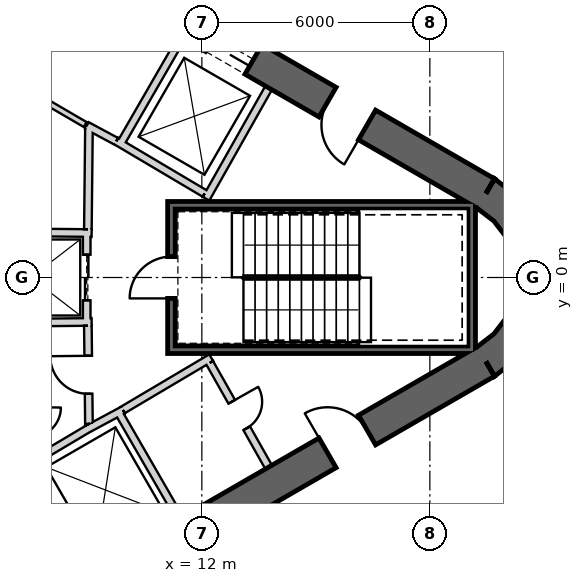
"""IFC4 building model, lengths in metres.
Left out: names, types, materials, properties, quantities, classifications, styles, units other than length and angle.
Written with IfcOpenShell. Run it as: python <this file> out.ifc"""

import sys

from ifc_helpers import new_model, si_unit, direction, frame, frame_2d, origin, place, context, subcontext, project, spatial, polyline, rectangle, outline, extrude, element, fill, save


model = new_model("IFC4")
c1 = context("Model", 3, precision=1e-05, world=origin(), true_north=direction((0.0, 1.0)))
c2 = subcontext(c1, "Body", "Model", "MODEL_VIEW")
j1 = project(units=[si_unit("LENGTHUNIT", "METRE"), si_unit("PLANEANGLEUNIT", "RADIAN")], contexts=[c1])
p1 = place(None, origin())
s1 = spatial("IfcSite", under=j1, at=p1, CompositionType="ELEMENT")
p2 = place(p1, origin())
s2 = spatial("IfcBuilding", under=s1, at=p2, CompositionType="ELEMENT")
p3 = place(p2, frame((0.0, 0.0, 298.7)))
s3 = spatial("IfcBuildingStorey", under=s2, at=p3, CompositionType="ELEMENT", Elevation=298.7)
p4 = place(p3, frame((19.475, 2.208, 0.0), z_axis=(0.0, 0.0, 1.0), x_axis=(-0.866028369851, 0.499994862586, 0.0)))
e1 = element("IfcWall", 1, at=p4, inside=s3, PredefinedType="SHEAR", context=c2, shape_type="SweptSolid", body=[
    extrude(rectangle(XDim=31.523, YDim=0.9, at=frame_2d((15.762, 0.0))), origin(), (0.0, 0.0, 1.0), 3.9),
])
p5 = place(p4, frame((7.062, 0.0, 0.0)))
e2 = element("IfcOpeningElement", 2, at=p5, cuts=e1, PredefinedType="OPENING", context=c2, shape_type="SweptSolid", body=[
    extrude(rectangle(XDim=1.2, YDim=2.4, at=frame_2d((0.6, 1.2))), frame((0.0, 0.46, 0.0), z_axis=(0.0, -1.0, 0.0), x_axis=(1.0, 0.0, 0.0)), (0.0, 0.0, 1.0), 0.92),
])
p6 = place(p4, frame((3.612, 0.0, 0.0)))
e3 = element("IfcOpeningElement", 3, at=p6, cuts=e1, PredefinedType="OPENING", context=c2, shape_type="SweptSolid", body=[
    extrude(rectangle(XDim=1.2, YDim=2.4, at=frame_2d((0.6, 1.2))), frame((0.0, 0.46, 0.0), z_axis=(0.0, -1.0, 0.0), x_axis=(1.0, 0.0, 0.0)), (0.0, 0.0, 1.0), 0.92),
])
p7 = place(p4, frame((26.712, 0.0, 0.0)))
e4 = element("IfcOpeningElement", 4, at=p7, cuts=e1, PredefinedType="OPENING", context=c2, shape_type="SweptSolid", body=[
    extrude(rectangle(XDim=1.2, YDim=2.4, at=frame_2d((0.6, 1.2))), frame((0.0, 0.46, 0.0), z_axis=(0.0, -1.0, 0.0), x_axis=(1.0, 0.0, 0.0)), (0.0, 0.0, 1.0), 0.92),
])
p8 = place(p3, frame((-7.825, -17.97, 0.0), z_axis=(0.0, 0.0, 1.0), x_axis=(0.866028369851, 0.499994862586, 0.0)))
e5 = element("IfcWall", 5, at=p8, inside=s3, PredefinedType="SHEAR", context=c2, shape_type="SweptSolid", body=[
    extrude(rectangle(XDim=31.523, YDim=0.9, at=frame_2d((15.762, 0.0))), origin(), (0.0, 0.0, 1.0), 3.9),
])
p9 = place(p8, frame((17.862, 0.0, 0.0)))
e6 = element("IfcOpeningElement", 6, at=p9, cuts=e5, PredefinedType="OPENING", context=c2, shape_type="SweptSolid", body=[
    extrude(rectangle(XDim=1.2, YDim=2.4, at=frame_2d((0.6, 1.2))), frame((0.0, 0.46, 0.0), z_axis=(0.0, -1.0, 0.0), x_axis=(1.0, 0.0, 0.0)), (0.0, 0.0, 1.0), 0.92),
])
p10 = place(p8, frame((20.562, 0.0, 0.0)))
e7 = element("IfcOpeningElement", 7, at=p10, cuts=e5, PredefinedType="OPENING", context=c2, shape_type="SweptSolid", body=[
    extrude(rectangle(XDim=1.2, YDim=2.4, at=frame_2d((0.6, 1.2))), frame((0.0, 0.46, 0.0), z_axis=(0.0, -1.0, 0.0), x_axis=(1.0, 0.0, 0.0)), (0.0, 0.0, 1.0), 0.92),
])
p11 = place(p8, frame((26.712, 0.0, 0.0)))
e8 = element("IfcOpeningElement", 8, at=p11, cuts=e5, PredefinedType="OPENING", context=c2, shape_type="SweptSolid", body=[
    extrude(rectangle(XDim=1.2, YDim=2.4, at=frame_2d((0.6, 1.2))), frame((0.0, 0.46, 0.0), z_axis=(0.0, -1.0, 0.0), x_axis=(1.0, 0.0, 0.0)), (0.0, 0.0, 1.0), 0.92),
])
p12 = place(p8, frame((3.612, 0.0, 0.0)))
e9 = element("IfcOpeningElement", 9, at=p12, cuts=e5, PredefinedType="OPENING", context=c2, shape_type="SweptSolid", body=[
    extrude(rectangle(XDim=1.2, YDim=2.4, at=frame_2d((0.6, 1.2))), frame((0.0, 0.46, 0.0), z_axis=(0.0, -1.0, 0.0), x_axis=(1.0, 0.0, 0.0)), (0.0, 0.0, 1.0), 0.92),
])
p13 = place(p3, origin())
e10 = element("IfcWall", 10, at=p13, inside=s3, PredefinedType="SHEAR", context=c2, shape_type="SweptSolid", body=[
    extrude(outline(polyline([(19.7, -2.598), (20.321, -2.121), (20.798, -1.5), (21.098, -0.777), (21.2, 0.0), (21.098, 0.777), (20.798, 1.5), (20.321, 2.121), (19.7, 2.598), (19.25, 1.819), (19.685, 1.485), (20.019, 1.05), (20.229, 0.543), (20.3, 0.0), (20.229, -0.543), (20.019, -1.05), (19.685, -1.485), (19.25, -1.819), (19.7, -2.598)])), origin(), (0.0, 0.0, 1.0), 3.9),
])
p14 = place(p3, frame((9.847, 3.495, 0.0), z_axis=(0.0, 0.0, 1.0), x_axis=(0.499984717929, 0.866034226713, 0.0)))
e11 = element("IfcWall", 11, at=p14, inside=s3, PredefinedType="PLUMBINGWALL", context=c2, shape_type="SweptSolid", body=[
    extrude(rectangle(XDim=3.25, YDim=0.2, at=frame_2d((1.625, 0.0))), origin(), (0.0, 0.0, 1.0), 3.6),
])
p15 = place(p3, frame((12.11, 2.073, 0.0), z_axis=(0.0, 0.0, 1.0), x_axis=(0.49196600604, 0.870614408852, 0.0)))
e12 = element("IfcWall", 12, at=p15, inside=s3, PredefinedType="PLUMBINGWALL", context=c2, shape_type="SweptSolid", body=[
    extrude(rectangle(XDim=3.35, YDim=0.2, at=frame_2d((1.675, 0.0))), origin(), (0.0, 0.0, 1.0), 3.6),
])
p16 = place(p3, frame((12.073, 2.211, 0.0), z_axis=(0.0, 0.0, 1.0), x_axis=(-0.860414880418, 0.509594185166, 0.0)))
e13 = element("IfcWall", 13, at=p16, inside=s3, PredefinedType="PLUMBINGWALL", context=c2, shape_type="SweptSolid", body=[
    extrude(rectangle(XDim=2.7, YDim=0.2, at=frame_2d((1.35, 0.0))), origin(), (0.0, 0.0, 1.0), 3.6),
])
p17 = place(p3, frame((9.795, -3.525, 0.0), z_axis=(0.0, 0.0, 1.0), x_axis=(0.499984717929, -0.866034226713, 0.0)))
e14 = element("IfcWall", 14, at=p17, inside=s3, PredefinedType="PLUMBINGWALL", context=c2, shape_type="SweptSolid", body=[
    extrude(rectangle(XDim=3.25, YDim=0.2, at=frame_2d((1.625, 0.0))), origin(), (0.0, 0.0, 1.0), 3.6),
])
p18 = place(p3, frame((8.974, -3.999, 0.0), z_axis=(0.0, 0.0, 1.0), x_axis=(0.880907015104, 0.473289373154, 0.0)))
e15 = element("IfcWall", 15, at=p18, inside=s3, PredefinedType="PLUMBINGWALL", context=c2, shape_type="SweptSolid", body=[
    extrude(rectangle(XDim=1.078, YDim=0.2, at=frame_2d((0.539, 0.0))), origin(), (0.0, 0.0, 1.0), 3.6),
])
p19 = place(p3, frame((7.493, -4.878, 0.0), z_axis=(0.0, 0.0, 1.0), x_axis=(0.859981807212, 0.510324691999, 0.0)))
e16 = element("IfcWall", 16, at=p19, inside=s3, PredefinedType="PLUMBINGWALL", context=c2, shape_type="SweptSolid", body=[
    extrude(rectangle(XDim=1.845, YDim=0.2, at=frame_2d((0.922, 0.0))), origin(), (0.0, 0.0, 1.0), 3.6),
])
p20 = place(p3, frame((19.2, 1.9, -0.3), z_axis=(0.0, 0.0, 1.0), x_axis=(-1.0, 0.0, 0.0)))
e17 = element("IfcWall", 17, at=p20, inside=s3, PredefinedType="SHEAR", context=c2, shape_type="SweptSolid", body=[
    extrude(rectangle(XDim=8.1, YDim=0.2, at=frame_2d((4.05, 0.0))), origin(), (0.0, 0.0, 1.0), 3.9),
])
p21 = place(p3, frame((19.1, -2.0, -0.3), z_axis=(0.0, 0.0, 1.0), x_axis=(0.0, 1.0, 0.0)))
e18 = element("IfcWall", 18, at=p21, inside=s3, PredefinedType="SHEAR", context=c2, shape_type="SweptSolid", body=[
    extrude(rectangle(XDim=3.8, YDim=0.2, at=frame_2d((1.9, 0.0))), origin(), (0.0, 0.0, 1.0), 3.9),
])
p22 = place(p3, frame((11.1, -1.9, -0.3), z_axis=(0.0, 0.0, 1.0), x_axis=(1.0, 0.0, 0.0)))
e19 = element("IfcWall", 19, at=p22, inside=s3, PredefinedType="SHEAR", context=c2, shape_type="SweptSolid", body=[
    extrude(rectangle(XDim=7.9, YDim=0.2, at=frame_2d((3.95, 0.0))), origin(), (0.0, 0.0, 1.0), 3.9),
])
p23 = place(p3, frame((11.2, -1.8, -0.3), z_axis=(0.0, 0.0, 1.0), x_axis=(0.0, 1.0, 0.0)))
e20 = element("IfcWall", 20, at=p23, inside=s3, PredefinedType="SHEAR", context=c2, shape_type="SweptSolid", body=[
    extrude(rectangle(XDim=3.6, YDim=0.2, at=frame_2d((1.8, 0.0))), origin(), (0.0, 0.0, 1.0), 3.9),
])
p24 = place(p23, frame((1.25, 0.0, 0.3)))
e21 = element("IfcOpeningElement", 21, at=p24, cuts=e20, PredefinedType="OPENING", context=c2, shape_type="SweptSolid", body=[
    extrude(rectangle(XDim=1.1, YDim=2.1, at=frame_2d((0.55, 1.05))), frame((0.0, 0.11, 0.0), z_axis=(0.0, -1.0, 0.0), x_axis=(1.0, 0.0, 0.0)), (0.0, 0.0, 1.0), 0.22),
])
p25 = place(p3, frame((8.97, 1.2, 0.0), z_axis=(0.0, 0.0, 1.0), x_axis=(0.0, -1.0, 0.0)))
e22 = element("IfcWall", 22, at=p25, inside=s3, PredefinedType="PLUMBINGWALL", context=c2, shape_type="SweptSolid", body=[
    extrude(rectangle(XDim=2.4, YDim=0.2, at=frame_2d((1.2, 0.0))), origin(), (0.0, 0.0, 1.0), 3.6),
])
p26 = place(p25, frame((0.6, 0.0, 0.0)))
e23 = element("IfcOpeningElement", 23, at=p26, cuts=e22, PredefinedType="OPENING", context=c2, shape_type="SweptSolid", body=[
    extrude(rectangle(XDim=1.2, YDim=2.4, at=frame_2d((0.6, 1.2))), frame((0.0, 0.11, 0.0), z_axis=(0.0, -1.0, 0.0), x_axis=(1.0, 0.0, 0.0)), (0.0, 0.0, 1.0), 0.22),
])
p27 = place(p3, frame((6.0, 1.2, 0.0), z_axis=(0.0, 0.0, 1.0), x_axis=(0.999949988, -0.010001074852, 0.0)))
e24 = element("IfcWall", 24, at=p27, inside=s3, PredefinedType="PLUMBINGWALL", context=c2, shape_type="SweptSolid", body=[
    extrude(rectangle(XDim=3.1, YDim=0.2, at=frame_2d((1.55, 0.0))), origin(), (0.0, 0.0, 1.0), 3.6),
])
p28 = place(p3, frame((5.9, -1.201, 0.0), z_axis=(0.0, 0.0, 1.0), x_axis=(0.999950064753, 0.009993397809, 0.0)))
e25 = element("IfcWall", 25, at=p28, inside=s3, PredefinedType="PLUMBINGWALL", context=c2, shape_type="SweptSolid", body=[
    extrude(rectangle(XDim=3.2, YDim=0.2, at=frame_2d((1.6, 0.0))), origin(), (0.0, 0.0, 1.0), 3.6),
])
p29 = place(p3, frame((8.974, 3.999, 0.0), z_axis=(0.0, 0.0, 1.0), x_axis=(0.880917147855, -0.473270513147, 0.0)))
e26 = element("IfcWall", 26, at=p29, inside=s3, PredefinedType="PARTITIONING", context=c2, shape_type="SweptSolid", body=[
    extrude(rectangle(XDim=0.878, YDim=0.2, at=frame_2d((0.439, 0.0))), origin(), (0.0, 0.0, 1.0), 3.6),
])
p30 = place(p3, frame((8.931, 4.024, 0.0), z_axis=(0.0, 0.0, 1.0), x_axis=(-0.863936620311, 0.50360055211, 0.0)))
e27 = element("IfcWall", 27, at=p30, inside=s3, PredefinedType="PLUMBINGWALL", context=c2, shape_type="SweptSolid", body=[
    extrude(rectangle(XDim=7.072, YDim=0.15, at=frame_2d((3.536, 0.0))), origin(), (0.0, 0.0, 1.0), 3.6),
])
p31 = place(p3, frame((12.245, -2.109, 0.0), z_axis=(0.0, 0.0, 1.0), x_axis=(-0.860414880418, -0.509594185166, 0.0)))
e28 = element("IfcWall", 28, at=p31, inside=s3, PredefinedType="PARTITIONING", context=c2, shape_type="SweptSolid", body=[
    extrude(rectangle(XDim=2.7, YDim=0.2, at=frame_2d((1.35, 0.0))), origin(), (0.0, 0.0, 1.0), 3.6),
])
p32 = place(p3, frame((13.758, -4.99, 0.0), z_axis=(0.0, 0.0, 1.0), x_axis=(-0.491993409184, 0.87059892334, 0.0)))
e29 = element("IfcWall", 29, at=p32, inside=s3, PredefinedType="PARTITIONING", context=c2, shape_type="SweptSolid", body=[
    extrude(rectangle(XDim=3.15, YDim=0.2, at=frame_2d((1.575, 0.0))), origin(), (0.0, 0.0, 1.0), 3.6),
])
p33 = place(p32, frame((1.175, 0.0, 0.0)))
e30 = element("IfcOpeningElement", 30, at=p33, cuts=e29, PredefinedType="OPENING", context=c2, shape_type="SweptSolid", body=[
    extrude(rectangle(XDim=0.8, YDim=2.1, at=frame_2d((0.4, 1.05))), frame((0.0, 0.11, 0.0), z_axis=(0.0, -1.0, 0.0), x_axis=(1.0, 0.0, 0.0)), (0.0, 0.0, 1.0), 0.22),
])
p34 = place(p3, frame((9.001, 1.27, 0.0), z_axis=(0.0, 0.0, 1.0), x_axis=(0.010747252091, 0.999942246619, 0.0)))
e31 = element("IfcWall", 31, at=p34, inside=s3, PredefinedType="PARTITIONING", context=c2, shape_type="SweptSolid", body=[
    extrude(rectangle(XDim=2.726, YDim=0.2, at=frame_2d((1.363, 0.0))), origin(), (0.0, 0.0, 1.0), 3.6),
])
p35 = place(p3, frame((9.029, -3.851, 0.0), z_axis=(0.0, 0.0, 1.0), x_axis=(-0.010783593937, 0.99994185536, 0.0)))
e32 = element("IfcWall", 32, at=p35, inside=s3, PredefinedType="PARTITIONING", context=c2, shape_type="SweptSolid", body=[
    extrude(rectangle(XDim=2.581, YDim=0.2, at=frame_2d((1.291, 0.0))), origin(), (0.0, 0.0, 1.0), 3.6),
])
p36 = place(p35, frame((0.791, 0.0, 0.0)))
e33 = element("IfcOpeningElement", 33, at=p36, cuts=e32, PredefinedType="OPENING", context=c2, shape_type="SweptSolid", body=[
    extrude(rectangle(XDim=1.0, YDim=2.1, at=frame_2d((0.5, 1.05))), frame((0.0, 0.11, 0.0), z_axis=(0.0, -1.0, 0.0), x_axis=(1.0, 0.0, 0.0)), (0.0, 0.0, 1.0), 0.22),
])
p37 = place(p3, frame((20.861, 5.854, 0.0), z_axis=(0.0, 0.0, 1.0), x_axis=(-0.86603339999, 0.499986149909, 0.0)))
e34 = element("IfcWall", 34, at=p37, inside=s3, PredefinedType="PARTITIONING", context=c2, shape_type="SweptSolid", body=[
    extrude(rectangle(XDim=4.969, YDim=0.12, at=frame_2d((2.484, 0.0))), origin(), (0.0, 0.0, 1.0), 2.88),
])
p38 = place(p37, frame((1.984, 0.0, 0.0)))
e35 = element("IfcOpeningElement", 35, at=p38, cuts=e34, PredefinedType="OPENING", context=c2, shape_type="SweptSolid", body=[
    extrude(rectangle(XDim=1.0, YDim=2.1, at=frame_2d((0.5, 1.05))), frame((0.0, 0.07, 0.0), z_axis=(0.0, -1.0, 0.0), x_axis=(1.0, 0.0, 0.0)), (0.0, 0.0, 1.0), 0.14),
])
p39 = place(p3, frame((1.415, -17.312, 0.0), z_axis=(0.0, 0.0, 1.0), x_axis=(0.866022488339, 0.500005049665, 0.0)))
e36 = element("IfcWall", 36, at=p39, inside=s3, PredefinedType="PARTITIONING", context=c2, shape_type="SweptSolid", body=[
    extrude(rectangle(XDim=23.806, YDim=0.2, at=frame_2d((11.903, 0.0))), origin(), (0.0, 0.0, 1.0), 2.88),
])
p40 = place(p39, frame((11.403, 0.0, 0.0)))
e37 = element("IfcOpeningElement", 37, at=p40, cuts=e36, PredefinedType="OPENING", context=c2, shape_type="SweptSolid", body=[
    extrude(rectangle(XDim=1.0, YDim=2.1, at=frame_2d((0.5, 1.05))), frame((0.0, 0.11, 0.0), z_axis=(0.0, -1.0, 0.0), x_axis=(1.0, 0.0, 0.0)), (0.0, 0.0, 1.0), 0.22),
])
p41 = place(p24, origin())
e38 = element("IfcDoor", 38, at=p41, inside=s3, OperationType="SINGLE_SWING_RIGHT", PredefinedType="USERDEFINED", context=c2, shape_type="SweptSolid", body=[
    extrude(rectangle(XDim=1.1, YDim=2.1, at=frame_2d((0.55, 1.05))), frame((0.0, 0.025, 0.0), z_axis=(0.0, -1.0, 0.0), x_axis=(1.0, 0.0, 0.0)), (0.0, 0.0, 1.0), 0.05),
])
fill(e21, e38)
p42 = place(p36, origin())
e39 = element("IfcDoor", 39, at=p42, inside=s3, OperationType="SINGLE_SWING_RIGHT", PredefinedType="USERDEFINED", context=c2, shape_type="SweptSolid", body=[
    extrude(rectangle(XDim=1.0, YDim=2.1, at=frame_2d((0.5, 1.05))), frame((0.0, 0.025, 0.0), z_axis=(0.0, -1.0, 0.0), x_axis=(1.0, 0.0, 0.0)), (0.0, 0.0, 1.0), 0.05),
])
fill(e33, e39)
p43 = place(p26, origin())
e40 = element("IfcDoor", 40, at=p43, inside=s3, OperationType="SLIDING_TO_LEFT", PredefinedType="USERDEFINED", context=c2, shape_type="SweptSolid", body=[
    extrude(rectangle(XDim=1.2, YDim=2.4, at=frame_2d((0.6, 1.2))), frame((0.0, 0.025, 0.0), z_axis=(0.0, -1.0, 0.0), x_axis=(1.0, 0.0, 0.0)), (0.0, 0.0, 1.0), 0.05),
])
fill(e23, e40)
p44 = place(p33, origin())
e41 = element("IfcDoor", 41, at=p44, inside=s3, OperationType="SINGLE_SWING_RIGHT", PredefinedType="USERDEFINED", context=c2, shape_type="SweptSolid", body=[
    extrude(rectangle(XDim=0.8, YDim=2.1, at=frame_2d((0.4, 1.05))), frame((0.0, 0.025, 0.0), z_axis=(0.0, -1.0, 0.0), x_axis=(1.0, 0.0, 0.0)), (0.0, 0.0, 1.0), 0.05),
])
fill(e30, e41)
p45 = place(p5, origin())
e42 = element("IfcDoor", 42, at=p45, inside=s3, OperationType="SLIDING_TO_LEFT", PredefinedType="USERDEFINED", context=c2, shape_type="SweptSolid", body=[
    extrude(rectangle(XDim=1.2, YDim=2.4, at=frame_2d((0.6, 1.2))), frame((0.0, 0.025, 0.0), z_axis=(0.0, -1.0, 0.0), x_axis=(1.0, 0.0, 0.0)), (0.0, 0.0, 1.0), 0.05),
])
fill(e2, e42)
p46 = place(p11, origin())
e43 = element("IfcDoor", 43, at=p46, inside=s3, OperationType="SINGLE_SWING_RIGHT", PredefinedType="USERDEFINED", context=c2, shape_type="SweptSolid", body=[
    extrude(rectangle(XDim=1.2, YDim=2.4, at=frame_2d((0.6, 1.2))), frame((0.0, 0.025, 0.0), z_axis=(0.0, -1.0, 0.0), x_axis=(1.0, 0.0, 0.0)), (0.0, 0.0, 1.0), 0.05),
])
fill(e8, e43)
p47 = place(p6, origin())
e44 = element("IfcDoor", 44, at=p47, inside=s3, OperationType="SINGLE_SWING_RIGHT", PredefinedType="USERDEFINED", context=c2, shape_type="SweptSolid", body=[
    extrude(rectangle(XDim=1.2, YDim=2.4, at=frame_2d((0.6, 1.2))), frame((0.0, 0.025, 0.0), z_axis=(0.0, -1.0, 0.0), x_axis=(1.0, 0.0, 0.0)), (0.0, 0.0, 1.0), 0.05),
])
fill(e3, e44)
save(model, sys.argv[1])
